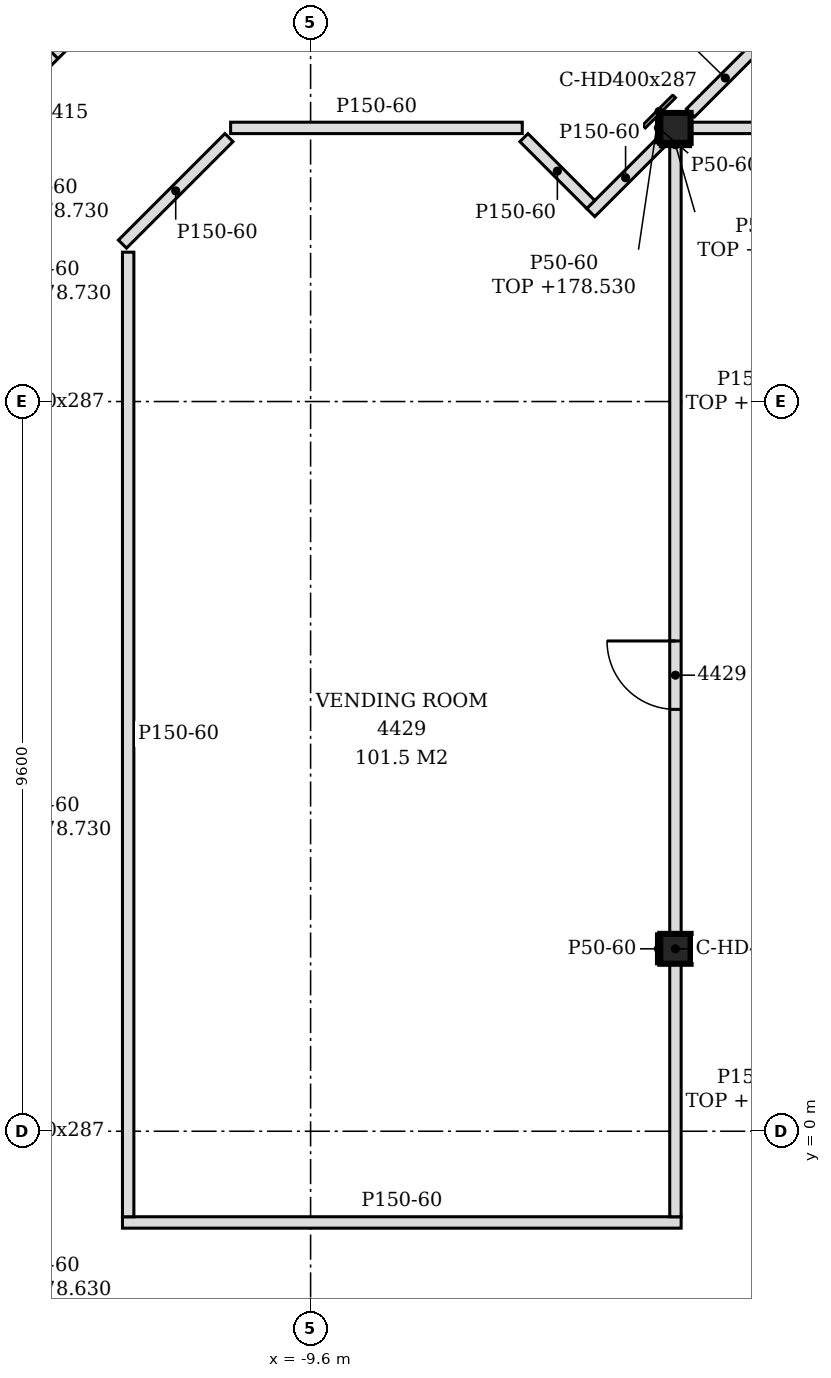
"""IFC4 building model, lengths in metres.
Left out: names, types, materials, properties, quantities, classifications, styles, units other than length and angle.
Written with IfcOpenShell. Run it as: python <this file> out.ifc"""

import sys

from ifc_helpers import new_model, si_unit, direction, frame, frame_2d, origin, origin_2d, place, context, subcontext, project, spatial, polyline, rectangle, i_section, outline, extrude, element, fill, save


model = new_model("IFC4")
c1 = context("Model", 3, precision=1e-05, world=origin(), true_north=direction((0.0, 1.0)))
c2 = subcontext(c1, "Body", "Model", "MODEL_VIEW")
j1 = project(units=[si_unit("LENGTHUNIT", "METRE"), si_unit("PLANEANGLEUNIT", "RADIAN")], contexts=[c1])
p1 = place(None, origin())
s1 = spatial("IfcSite", under=j1, at=p1, CompositionType="ELEMENT")
p2 = place(p1, origin())
s2 = spatial("IfcBuilding", under=s1, at=p2, CompositionType="ELEMENT")
p3 = place(p2, frame((0.0, 0.0, 175.8)))
s3 = spatial("IfcBuildingStorey", under=s2, at=p3, CompositionType="ELEMENT", Elevation=175.8)
for number, where, z_axis, x_axis in (
    (1, (-4.8, 2.4, -0.15), (0.0, 0.0, 1.0), (1.0, 0.0, 0.0)),
    (2, (-4.8, 13.2, -0.15), (0.0, 0.0, 1.0), (1.0, 0.0, 0.0)),
):
    element("IfcColumn", number, at=place(p3, frame(where, z_axis=z_axis, x_axis=x_axis)), inside=s3, PredefinedType="COLUMN", context=c2, shape_type="SweptSolid", body=[
        extrude(i_section(OverallWidth=0.399, OverallDepth=0.393, WebThickness=0.023, FlangeThickness=0.037, FilletRadius=0.015, at=origin_2d()), origin(), (0.0, 0.0, 1.0), 3.6),
    ])
p4 = place(p3, frame((-12.075, -1.2, 0.0), z_axis=(0.0, 0.0, 1.0), x_axis=(1.0, 0.0, 0.0)))
e3 = element("IfcWall", 3, at=p4, inside=s3, PredefinedType="PARTITIONING", context=c2, shape_type="SweptSolid", body=[
    extrude(outline(polyline([(0.0, 0.0), (7.35, 0.0), (7.35, 2.83), (7.125, 2.83), (7.123, 3.45), (0.0, 3.45), (0.0, 0.0)])), frame((0.0, 0.075, 0.0), z_axis=(0.0, -1.0, 0.0), x_axis=(1.0, 0.0, 0.0)), (0.0, 0.0, 1.0), 0.15),
])
p5 = place(p3, frame((-12.0, -1.125, 0.0), z_axis=(0.0, 0.0, 1.0), x_axis=(0.0, 1.0, 0.0)))
e4 = element("IfcWall", 4, at=p5, inside=s3, PredefinedType="PARTITIONING", context=c2, shape_type="SweptSolid", body=[
    extrude(outline(polyline([(0.0, 0.0), (12.69, 0.0), (12.69, 3.45), (10.225, 3.45), (10.223, 2.93), (10.025, 2.93), (10.023, 3.45), (5.425, 3.45), (5.423, 2.93), (5.225, 2.93), (5.223, 3.45), (0.625, 3.45), (0.623, 2.93), (0.425, 2.93), (0.423, 3.45), (0.0, 3.45), (0.0, 0.0)])), frame((0.0, 0.075, 0.0), z_axis=(0.0, -1.0, 0.0), x_axis=(1.0, 0.0, 0.0)), (0.0, 0.0, 1.0), 0.15),
])
p6 = place(p3, frame((-4.8, -1.125, 0.0), z_axis=(0.0, 0.0, 1.0), x_axis=(0.0, 1.0, 0.0)))
e5 = element("IfcWall", 5, at=p6, inside=s3, PredefinedType="PARTITIONING", context=c2, shape_type="SweptSolid", body=[
    extrude(rectangle(XDim=3.329, YDim=0.15, at=frame_2d((1.664, 0.0))), origin(), (0.0, 0.0, 1.0), 2.83),
])
p7 = place(p3, frame((-4.8, 2.596, 0.0), z_axis=(0.0, 0.0, 1.0), x_axis=(0.0, 1.0, 0.0)))
e6 = element("IfcWall", 6, at=p7, inside=s3, PredefinedType="PARTITIONING", context=c2, shape_type="SweptSolid", body=[
    extrude(rectangle(XDim=10.407, YDim=0.15, at=frame_2d((5.204, 0.0))), origin(), (0.0, 0.0, 1.0), 2.83),
])
p8 = place(p7, frame((2.954, 0.0, 0.0)))
e7 = element("IfcOpeningElement", 7, at=p8, cuts=e6, PredefinedType="OPENING", context=c2, shape_type="SweptSolid", body=[
    extrude(rectangle(XDim=0.9, YDim=2.1, at=frame_2d((0.45, 1.05))), frame((0.0, 0.085, 0.0), z_axis=(0.0, -1.0, 0.0), x_axis=(1.0, 0.0, 0.0)), (0.0, 0.0, 1.0), 0.17),
])
p9 = place(p3, frame((-12.075, 11.671, 0.0), z_axis=(0.0, 0.0, 1.0), x_axis=(0.707045167735, 0.70716838927, 0.0)))
e8 = element("IfcWall", 8, at=p9, inside=s3, PredefinedType="PARTITIONING", context=c2, shape_type="SweptSolid", body=[
    extrude(rectangle(XDim=1.981, YDim=0.15, at=frame_2d((0.991, 0.0))), origin(), (0.0, 0.0, 1.0), 3.45),
])
p10 = place(p3, frame((-5.914, 12.086, 0.0), z_axis=(0.0, 0.0, 1.0), x_axis=(0.707106781187, 0.707106781187, 0.0)))
e9 = element("IfcWall", 9, at=p10, inside=s3, PredefinedType="PARTITIONING", context=c2, shape_type="SweptSolid", body=[
    extrude(rectangle(XDim=1.295, YDim=0.15, at=frame_2d((0.648, 0.0))), origin(), (0.0, 0.0, 1.0), 3.45),
])
p11 = place(p3, frame((-5.914, 12.192, 0.0), z_axis=(0.0, 0.0, 1.0), x_axis=(-0.706812296552, 0.70740114323, 0.0)))
e10 = element("IfcWall", 10, at=p11, inside=s3, PredefinedType="PARTITIONING", context=c2, shape_type="SweptSolid", body=[
    extrude(rectangle(XDim=1.244, YDim=0.15, at=frame_2d((0.622, 0.0))), origin(), (0.0, 0.0, 1.0), 3.45),
])
p12 = place(p3, frame((-14.475, 12.665, 0.0), z_axis=(0.0, 0.0, 1.0), x_axis=(0.70726258305, 0.706950944987, 0.0)))
e11 = element("IfcWall", 11, at=p12, inside=s3, PredefinedType="PARTITIONING", context=c2, shape_type="SweptSolid", body=[
    extrude(rectangle(XDim=3.134, YDim=0.15, at=frame_2d((1.567, 0.0))), origin(), (0.0, 0.0, 1.0), 2.93),
])
p13 = place(p12, frame((1.22, 0.0, 0.0)))
e12 = element("IfcOpeningElement", 12, at=p13, cuts=e11, PredefinedType="OPENING", context=c2, shape_type="SweptSolid", body=[
    extrude(rectangle(XDim=0.9, YDim=2.1, at=frame_2d((0.45, 1.05))), frame((0.0, 0.085, 0.0), z_axis=(0.0, -1.0, 0.0), x_axis=(1.0, 0.0, 0.0)), (0.0, 0.0, 1.0), 0.17),
])
p14 = place(p3, frame((-10.652, 13.2, 0.0), z_axis=(0.0, 0.0, 1.0), x_axis=(1.0, 0.0, 0.0)))
e13 = element("IfcWall", 13, at=p14, inside=s3, PredefinedType="PARTITIONING", context=c2, shape_type="SweptSolid", body=[
    extrude(rectangle(XDim=3.837, YDim=0.15, at=frame_2d((1.918, 0.0))), origin(), (0.0, 0.0, 1.0), 3.45),
])
p15 = place(p3, frame((-4.601, 13.2, 0.0), z_axis=(0.0, 0.0, 1.0), x_axis=(1.0, 0.0, 0.0)))
e14 = element("IfcWall", 14, at=p15, inside=s3, PredefinedType="PARTITIONING", context=c2, shape_type="SweptSolid", body=[
    extrude(rectangle(XDim=4.676, YDim=0.15, at=frame_2d((2.338, 0.0))), origin(), (0.0, 0.0, 1.0), 2.83),
])
p16 = place(p3, frame((-4.602, 13.398, 0.0), z_axis=(0.0, 0.0, 1.0), x_axis=(0.707106781187, 0.707106781187, 0.0)))
e15 = element("IfcWall", 15, at=p16, inside=s3, PredefinedType="PARTITIONING", context=c2, shape_type="SweptSolid", body=[
    extrude(rectangle(XDim=1.296, YDim=0.15, at=frame_2d((0.648, 0.0))), origin(), (0.0, 0.0, 1.0), 3.45),
])
p17 = place(p3, frame((-5.024, 2.204, 0.0), z_axis=(0.0, 0.0, 1.0), x_axis=(0.0, 1.0, 0.0)))
e16 = element("IfcWall", 16, at=p17, inside=s3, PredefinedType="PARTITIONING", context=c2, shape_type="SweptSolid", body=[
    extrude(rectangle(XDim=0.393, YDim=0.05, at=frame_2d((0.196, 0.0))), origin(), (0.0, 0.0, 1.0), 3.45),
])
p18 = place(p3, frame((-5.024, 13.003, 0.0), z_axis=(0.0, 0.0, 1.0), x_axis=(0.0, 1.0, 0.0)))
e17 = element("IfcWall", 17, at=p18, inside=s3, PredefinedType="PARTITIONING", context=c2, shape_type="SweptSolid", body=[
    extrude(rectangle(XDim=0.393, YDim=0.05, at=frame_2d((0.197, 0.0))), origin(), (0.0, 0.0, 1.0), 3.45),
])
p19 = place(p3, frame((-5.214, 13.218, 0.0), z_axis=(0.0, 0.0, 1.0), x_axis=(0.707106781187, 0.707106781187, 0.0)))
e18 = element("IfcWall", 18, at=p19, inside=s3, PredefinedType="PARTITIONING", context=c2, shape_type="SweptSolid", body=[
    extrude(rectangle(XDim=0.56, YDim=0.05, at=frame_2d((0.28, 0.0))), origin(), (0.0, 0.0, 1.0), 2.73),
])
p20 = place(p3, frame((-5.0, 12.979, 0.0), z_axis=(0.0, 0.0, 1.0), x_axis=(1.0, 0.0, 0.0)))
e19 = element("IfcWall", 19, at=p20, inside=s3, PredefinedType="PARTITIONING", context=c2, shape_type="SweptSolid", body=[
    extrude(rectangle(XDim=0.399, YDim=0.05, at=frame_2d((0.199, 0.0))), origin(), (0.0, 0.0, 1.0), 2.83),
])
p21 = place(p13, origin())
e20 = element("IfcDoor", 20, at=p21, inside=s3, OperationType="SINGLE_SWING_LEFT", PredefinedType="DOOR", context=c2, shape_type="SweptSolid", body=[
    extrude(rectangle(XDim=0.9, YDim=2.1, at=frame_2d((0.45, 1.05))), frame((0.0, 0.025, 0.0), z_axis=(0.0, -1.0, 0.0), x_axis=(1.0, 0.0, 0.0)), (0.0, 0.0, 1.0), 0.05),
])
fill(e12, e20)
p22 = place(p8, origin())
e21 = element("IfcDoor", 21, at=p22, inside=s3, OperationType="SINGLE_SWING_RIGHT", PredefinedType="DOOR", context=c2, shape_type="SweptSolid", body=[
    extrude(rectangle(XDim=0.9, YDim=2.1, at=frame_2d((0.45, 1.05))), frame((0.0, 0.025, 0.0), z_axis=(0.0, -1.0, 0.0), x_axis=(1.0, 0.0, 0.0)), (0.0, 0.0, 1.0), 0.05),
])
fill(e7, e21)
save(model, sys.argv[1])
